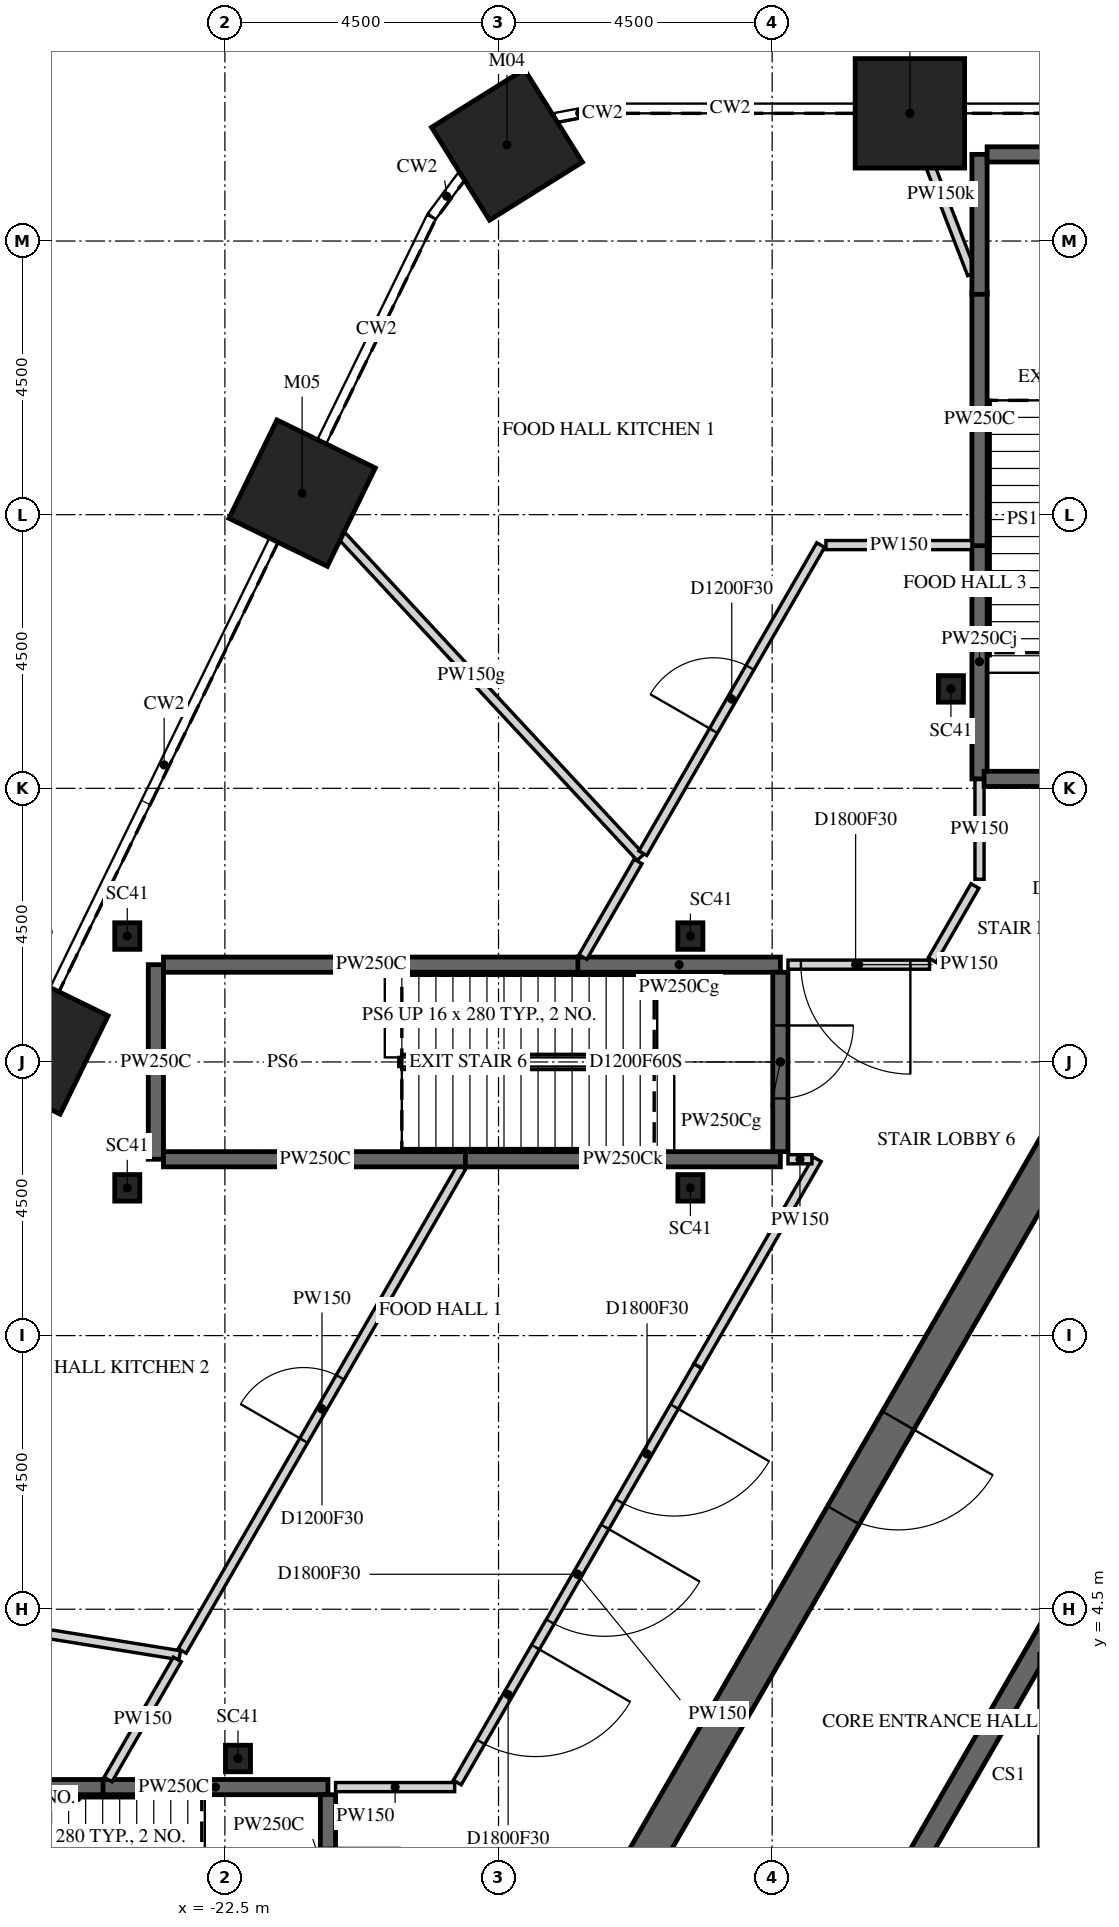
"""IFC4 building model, lengths in metres.
Left out: names, types, materials, properties, quantities, classifications, styles, units other than length and angle.
Written with IfcOpenShell. Run it as: python <this file> out.ifc"""

import sys

from ifc_helpers import new_model, si_unit, direction, frame, frame_2d, origin, origin_2d, place, context, subcontext, project, spatial, polyline, rectangle, i_section, outline, extrude, element, fill, save


model = new_model("IFC4")
c1 = context("Model", 3, precision=1e-05, world=origin(), true_north=direction((0.0, 1.0)))
c2 = subcontext(c1, "Body", "Model", "MODEL_VIEW")
j1 = project(units=[si_unit("LENGTHUNIT", "METRE"), si_unit("PLANEANGLEUNIT", "RADIAN")], contexts=[c1])
p1 = place(None, origin())
s1 = spatial("IfcSite", under=j1, at=p1, CompositionType="ELEMENT")
p2 = place(p1, origin())
s2 = spatial("IfcBuilding", under=s1, at=p2, CompositionType="ELEMENT")
p3 = place(p2, frame((0.0, 0.0, 20.5)))
s3 = spatial("IfcBuildingStorey", under=s2, at=p3, CompositionType="ELEMENT", Elevation=20.5)
for number, where, z_axis, x_axis in (
    (1, (-11.235, 29.1, -0.25), (0.0, 0.0, 1.0), (1.0, 0.0, 0.0)),
    (2, (-17.861, 28.583, -0.25), (0.0, 0.0, 1.0), (0.848, 0.53, 0.0)),
    (3, (-21.23, 22.854, -0.25), (0.0, 0.0, 1.0), (0.438, 0.899, 0.0)),
    (4, (-25.624, 13.845, -0.25), (0.0, 0.0, 1.0), (0.438, 0.899, 0.0)),
):
    element("IfcColumn", number, at=place(p3, frame(where, z_axis=z_axis, x_axis=x_axis)), inside=s3, PredefinedType="COLUMN", context=c2, shape_type="SweptSolid", body=[
        extrude(rectangle(XDim=1.8, YDim=1.8, at=origin_2d()), origin(), (0.0, 0.0, 1.0), 5.5),
    ])
for number, where, z_axis, x_axis in (
    (5, (-10.56, 19.635, -0.25), (0.0, 0.0, 1.0), (1.0, 0.0, 0.0)),
    (6, (-22.285, 2.045, -0.25), (0.0, 0.0, 1.0), (1.0, 0.0, 0.0)),
    (7, (-24.105, 11.43, -0.25), (0.0, 0.0, 1.0), (1.0, 0.0, 0.0)),
    (8, (-24.105, 15.57, -0.25), (0.0, 0.0, 1.0), (1.0, 0.0, 0.0)),
    (9, (-14.845, 15.57, -0.25), (0.0, 0.0, 1.0), (1.0, 0.0, 0.0)),
    (10, (-14.845, 11.43, -0.25), (0.0, 0.0, 1.0), (1.0, 0.0, 0.0)),
):
    element("IfcColumn", number, at=place(p3, frame(where, z_axis=z_axis, x_axis=x_axis)), inside=s3, PredefinedType="COLUMN", context=c2, shape_type="SweptSolid", body=[
        extrude(i_section(OverallWidth=0.412, OverallDepth=0.437, WebThickness=0.036, FlangeThickness=0.058, FilletRadius=0.015, at=origin_2d()), origin(), (0.0, 0.0, 1.0), 5.5),
    ])
p4 = place(p3, frame((-7.91, 13.7, -0.25), z_axis=(0.0, 0.0, 1.0), x_axis=(-0.499999880136, -0.866025472988, 0.0)))
e11 = element("IfcWall", 11, at=p4, inside=s3, PredefinedType="SHEAR", context=c2, shape_type="SweptSolid", body=[
    extrude(outline(polyline([(-0.173, -0.3), (15.993, -0.3), (15.646, 0.3), (0.173, 0.3), (-0.173, -0.3)])), origin(), (0.0, 0.0, 1.0), 5.5),
])
p5 = place(p4, frame((7.039, 0.0, 0.25)))
e12 = element("IfcOpeningElement", 12, at=p5, cuts=e11, PredefinedType="OPENING", context=c2, shape_type="SweptSolid", body=[
    extrude(rectangle(XDim=1.8, YDim=2.4, at=frame_2d((0.9, 1.2))), frame((0.0, 0.31, 0.0), z_axis=(0.0, -1.0, 0.0), x_axis=(1.0, 0.0, 0.0)), (0.0, 0.0, 1.0), 0.62),
])
p6 = place(p3, frame((-5.673, 9.825, -0.25), z_axis=(0.0, 0.0, 1.0), x_axis=(-0.499995046907, -0.866028263435, 0.0)))
e13 = element("IfcWall", 13, at=p6, inside=s3, PredefinedType="SHEAR", context=c2, shape_type="SweptSolid", body=[
    extrude(outline(polyline([(-0.101, -0.175), (11.446, -0.175), (11.244, 0.175), (0.101, 0.175), (-0.101, -0.175)])), origin(), (0.0, 0.0, 1.0), 5.5),
])
p7 = place(p6, frame((4.801, 0.0, 0.25)))
e14 = element("IfcOpeningElement", 14, at=p7, cuts=e13, PredefinedType="OPENING", context=c2, shape_type="SweptSolid", body=[
    extrude(rectangle(XDim=1.8, YDim=2.4, at=frame_2d((0.9, 1.2))), frame((0.0, 0.185, 0.0), z_axis=(0.0, -1.0, 0.0), x_axis=(1.0, 0.0, 0.0)), (0.0, 0.0, 1.0), 0.37),
])
p8 = place(p3, frame((-30.95, 1.575, 0.0), z_axis=(0.0, 0.0, 1.0), x_axis=(1.0, 0.0, 0.0)))
e15 = element("IfcWall", 15, at=p8, inside=s3, PredefinedType="PARTITIONING", context=c2, shape_type="SweptSolid", body=[
    extrude(rectangle(XDim=6.468, YDim=0.25, at=frame_2d((3.234, 0.0))), origin(), (0.0, 0.0, 1.0), 5.25),
])
p9 = place(p3, frame((-30.018, 4.836, 0.0), z_axis=(0.0, 0.0, 1.0), x_axis=(0.987261315122, -0.159107182941, 0.0)))
e16 = element("IfcWall", 16, at=p9, inside=s3, PredefinedType="PARTITIONING", context=c2, shape_type="SweptSolid", body=[
    extrude(rectangle(XDim=6.864, YDim=0.15, at=frame_2d((3.432, 0.0))), origin(), (0.0, 0.0, 1.0), 5.25),
])
p10 = place(p3, frame((-24.504, 1.575, 0.0), z_axis=(0.0, 0.0, 1.0), x_axis=(1.0, 0.0, 0.0)))
e17 = element("IfcWall", 17, at=p10, inside=s3, PredefinedType="PARTITIONING", context=c2, shape_type="SweptSolid", body=[
    extrude(rectangle(XDim=3.699, YDim=0.25, at=frame_2d((1.85, 0.0))), origin(), (0.0, 0.0, 1.0), 5.25),
])
p11 = place(p3, frame((-23.635, 11.9, 0.0), z_axis=(0.0, 0.0, 1.0), x_axis=(0.0, 1.0, 0.0)))
e18 = element("IfcWall", 18, at=p11, inside=s3, PredefinedType="PARTITIONING", context=c2, shape_type="SweptSolid", body=[
    extrude(rectangle(XDim=3.2, YDim=0.25, at=frame_2d((1.6, 0.0))), origin(), (0.0, 0.0, 1.0), 5.25),
])
p12 = place(p3, frame((-23.51, 15.1, 0.0), z_axis=(0.0, 0.0, 1.0), x_axis=(1.0, 0.0, 0.0)))
e19 = element("IfcWall", 19, at=p12, inside=s3, PredefinedType="PARTITIONING", context=c2, shape_type="SweptSolid", body=[
    extrude(rectangle(XDim=6.837, YDim=0.25, at=frame_2d((3.418, 0.0))), origin(), (0.0, 0.0, 1.0), 5.25),
])
p13 = place(p3, frame((-23.282, 3.675, 0.0), z_axis=(0.0, 0.0, 1.0), x_axis=(-0.49987077196, -0.866100000774, 0.0)))
e20 = element("IfcWall", 20, at=p13, inside=s3, PredefinedType="PARTITIONING", context=c2, shape_type="SweptSolid", body=[
    extrude(rectangle(XDim=2.28, YDim=0.15, at=frame_2d((1.14, 0.0))), origin(), (0.0, 0.0, 1.0), 5.25),
])
p14 = place(p3, frame((-21.23, 22.854, 0.0), z_axis=(0.0, 0.0, 1.0), x_axis=(0.680630925451, -0.732626469164, 0.0)))
e21 = element("IfcWall", 21, at=p14, inside=s3, PredefinedType="PARTITIONING", context=c2, shape_type="SweptSolid", body=[
    extrude(rectangle(XDim=8.175, YDim=0.15, at=frame_2d((4.087, 0.0))), origin(), (0.0, 0.0, 1.0), 4.488),
])
p15 = place(p3, frame((-20.805, 1.45, 0.0), z_axis=(0.0, 0.0, 1.0), x_axis=(0.0, -1.0, 0.0)))
e22 = element("IfcWall", 22, at=p15, inside=s3, PredefinedType="PARTITIONING", context=c2, shape_type="SweptSolid", body=[
    extrude(rectangle(XDim=2.95, YDim=0.25, at=frame_2d((1.475, 0.0))), origin(), (0.0, 0.0, 1.0), 5.25),
])
p16 = place(p15, frame((0.875, 0.0, 0.0)))
e23 = element("IfcOpeningElement", 23, at=p16, cuts=e22, PredefinedType="OPENING", context=c2, shape_type="SweptSolid", body=[
    extrude(rectangle(XDim=1.2, YDim=2.1, at=frame_2d((0.6, 1.05))), frame((0.0, 0.135, 0.0), z_axis=(0.0, -1.0, 0.0), x_axis=(1.0, 0.0, 0.0)), (0.0, 0.0, 1.0), 0.27),
])
p17 = place(p3, frame((-20.68, 1.575, 0.0), z_axis=(0.0, 0.0, 1.0), x_axis=(1.0, 0.0, 0.0)))
e24 = element("IfcWall", 24, at=p17, inside=s3, PredefinedType="PARTITIONING", context=c2, shape_type="SweptSolid", body=[
    extrude(rectangle(XDim=1.959, YDim=0.15, at=frame_2d((0.979, 0.0))), origin(), (0.0, 0.0, 1.0), 5.25),
])
p18 = place(p3, frame((-23.202, 3.813, 0.0), z_axis=(0.0, 0.0, 1.0), x_axis=(0.500012104326, 0.866018415236, 0.0)))
e25 = element("IfcWall", 25, at=p18, inside=s3, PredefinedType="PARTITIONING", context=c2, shape_type="SweptSolid", body=[
    extrude(rectangle(XDim=9.193, YDim=0.15, at=frame_2d((4.597, 0.0))), origin(), (0.0, 0.0, 1.0), 5.25),
])
p19 = place(p18, frame((3.997, 0.0, 0.0)))
e26 = element("IfcOpeningElement", 26, at=p19, cuts=e25, PredefinedType="OPENING", context=c2, shape_type="SweptSolid", body=[
    extrude(rectangle(XDim=1.2, YDim=2.1, at=frame_2d((0.6, 1.05))), frame((0.0, 0.085, 0.0), z_axis=(0.0, -1.0, 0.0), x_axis=(1.0, 0.0, 0.0)), (0.0, 0.0, 1.0), 0.17),
])
p20 = place(p3, frame((-18.523, 11.9, 0.0), z_axis=(0.0, 0.0, 1.0), x_axis=(-1.0, 0.0, 0.0)))
e27 = element("IfcWall", 27, at=p20, inside=s3, PredefinedType="PARTITIONING", context=c2, shape_type="SweptSolid", body=[
    extrude(rectangle(XDim=4.987, YDim=0.25, at=frame_2d((2.494, 0.0))), origin(), (0.0, 0.0, 1.0), 5.25),
])
p21 = place(p3, frame((-16.695, 15.1, 0.0), z_axis=(0.0, 0.0, 1.0), x_axis=(1.0, 0.0, 0.0)))
e28 = element("IfcWall", 28, at=p21, inside=s3, PredefinedType="PARTITIONING", context=c2, shape_type="SweptSolid", body=[
    extrude(rectangle(XDim=3.33, YDim=0.25, at=frame_2d((1.665, 0.0))), origin(), (0.0, 0.0, 1.0), 4.488),
])
p22 = place(p3, frame((-15.705, 16.797, 0.0), z_axis=(0.0, 0.0, 1.0), x_axis=(-0.499943671218, -0.86605792278, 0.0)))
e29 = element("IfcWall", 29, at=p22, inside=s3, PredefinedType="PARTITIONING", context=c2, shape_type="SweptSolid", body=[
    extrude(rectangle(XDim=1.815, YDim=0.15, at=frame_2d((0.908, 0.0))), origin(), (0.0, 0.0, 1.0), 5.25),
])
p23 = place(p3, frame((-14.722, 8.5, 0.0), z_axis=(0.0, 0.0, 1.0), x_axis=(-0.500085786821, -0.865975869075, 0.0)))
e30 = element("IfcWall", 30, at=p23, inside=s3, PredefinedType="PARTITIONING", context=c2, shape_type="SweptSolid", body=[
    extrude(rectangle(XDim=7.91, YDim=0.15, at=frame_2d((3.955, 0.0))), origin(), (0.0, 0.0, 1.0), 5.25),
])
p24 = place(p23, frame((0.771, 0.0, 0.0)))
e31 = element("IfcOpeningElement", 31, at=p24, cuts=e30, PredefinedType="OPENING", context=c2, shape_type="SweptSolid", body=[
    extrude(rectangle(XDim=1.8, YDim=2.1, at=frame_2d((0.9, 1.05))), frame((0.0, 0.085, 0.0), z_axis=(0.0, -1.0, 0.0), x_axis=(1.0, 0.0, 0.0)), (0.0, 0.0, 1.0), 0.17),
])
p25 = place(p23, frame((3.055, 0.0, 0.0)))
e32 = element("IfcOpeningElement", 32, at=p25, cuts=e30, PredefinedType="OPENING", context=c2, shape_type="SweptSolid", body=[
    extrude(rectangle(XDim=1.8, YDim=2.1, at=frame_2d((0.9, 1.05))), frame((0.0, 0.085, 0.0), z_axis=(0.0, -1.0, 0.0), x_axis=(1.0, 0.0, 0.0)), (0.0, 0.0, 1.0), 0.17),
])
p26 = place(p23, frame((5.339, 0.0, 0.0)))
e33 = element("IfcOpeningElement", 33, at=p26, cuts=e30, PredefinedType="OPENING", context=c2, shape_type="SweptSolid", body=[
    extrude(rectangle(XDim=1.8, YDim=2.1, at=frame_2d((0.9, 1.05))), frame((0.0, 0.085, 0.0), z_axis=(0.0, -1.0, 0.0), x_axis=(1.0, 0.0, 0.0)), (0.0, 0.0, 1.0), 0.17),
])
p27 = place(p3, frame((-13.365, 11.9, 0.0), z_axis=(0.0, 0.0, 1.0), x_axis=(-1.0, 0.0, 0.0)))
e34 = element("IfcWall", 34, at=p27, inside=s3, PredefinedType="PARTITIONING", context=c2, shape_type="SweptSolid", body=[
    extrude(rectangle(XDim=5.18, YDim=0.25, at=frame_2d((2.59, 0.0))), origin(), (0.0, 0.0, 1.0), 4.797),
])
p28 = place(p3, frame((-13.365, 14.975, 0.0), z_axis=(0.0, 0.0, 1.0), x_axis=(0.0, -1.0, 0.0)))
e35 = element("IfcWall", 35, at=p28, inside=s3, PredefinedType="PARTITIONING", context=c2, shape_type="SweptSolid", body=[
    extrude(rectangle(XDim=2.95, YDim=0.25, at=frame_2d((1.475, 0.0))), origin(), (0.0, 0.0, 1.0), 4.488),
])
p29 = place(p28, frame((0.875, 0.0, 0.0)))
e36 = element("IfcOpeningElement", 36, at=p29, cuts=e35, PredefinedType="OPENING", context=c2, shape_type="SweptSolid", body=[
    extrude(rectangle(XDim=1.2, YDim=2.1, at=frame_2d((0.6, 1.05))), frame((0.0, 0.135, 0.0), z_axis=(0.0, -1.0, 0.0), x_axis=(1.0, 0.0, 0.0)), (0.0, 0.0, 1.0), 0.27),
])
p30 = place(p3, frame((-10.912, 15.1, 0.0), z_axis=(0.0, 0.0, 1.0), x_axis=(-1.0, 0.0, 0.0)))
e37 = element("IfcWall", 37, at=p30, inside=s3, PredefinedType="PARTITIONING", context=c2, shape_type="SweptSolid", body=[
    extrude(rectangle(XDim=2.328, YDim=0.15, at=frame_2d((1.164, 0.0))), origin(), (0.0, 0.0, 1.0), 5.25),
])
p31 = place(p30, frame((0.315, 0.0, 0.0)))
e38 = element("IfcOpeningElement", 38, at=p31, cuts=e37, PredefinedType="OPENING", context=c2, shape_type="SweptSolid", body=[
    extrude(rectangle(XDim=1.8, YDim=2.1, at=frame_2d((0.9, 1.05))), frame((0.0, 0.085, 0.0), z_axis=(0.0, -1.0, 0.0), x_axis=(1.0, 0.0, 0.0)), (0.0, 0.0, 1.0), 0.17),
])
p32 = place(p3, frame((-12.759, 11.9, 0.0), z_axis=(0.0, 0.0, 1.0), x_axis=(-0.49999161165, -0.866030246746, 0.0)))
e39 = element("IfcWall", 39, at=p32, inside=s3, PredefinedType="PARTITIONING", context=c2, shape_type="SweptSolid", body=[
    extrude(rectangle(XDim=3.926, YDim=0.15, at=frame_2d((1.963, 0.0))), origin(), (0.0, 0.0, 1.0), 5.25),
])
p33 = place(p3, frame((-12.846, 11.9, 0.0), z_axis=(0.0, 0.0, 1.0), x_axis=(-1.0, 0.0, 0.0)))
e40 = element("IfcWall", 40, at=p33, inside=s3, PredefinedType="PARTITIONING", context=c2, shape_type="SweptSolid", body=[
    extrude(rectangle(XDim=0.394, YDim=0.15, at=frame_2d((0.197, 0.0))), origin(), (0.0, 0.0, 1.0), 5.25),
])
p34 = place(p3, frame((-15.627, 16.933, 0.0), z_axis=(0.0, 0.0, 1.0), x_axis=(0.499909086075, 0.866077886601, 0.0)))
e41 = element("IfcWall", 41, at=p34, inside=s3, PredefinedType="PARTITIONING", context=c2, shape_type="SweptSolid", body=[
    extrude(rectangle(XDim=5.851, YDim=0.15, at=frame_2d((2.925, 0.0))), origin(), (0.0, 0.0, 1.0), 5.25),
])
p35 = place(p34, frame((2.325, 0.0, 0.0)))
e42 = element("IfcOpeningElement", 42, at=p35, cuts=e41, PredefinedType="OPENING", context=c2, shape_type="SweptSolid", body=[
    extrude(rectangle(XDim=1.2, YDim=2.1, at=frame_2d((0.6, 1.05))), frame((0.0, 0.085, 0.0), z_axis=(0.0, -1.0, 0.0), x_axis=(1.0, 0.0, 0.0)), (0.0, 0.0, 1.0), 0.17),
])
p36 = place(p3, frame((-11.235, 29.1, 0.0), z_axis=(0.0, 0.0, 1.0), x_axis=(0.360012438309, -0.932947503487, 0.0)))
e43 = element("IfcWall", 43, at=p36, inside=s3, PredefinedType="PARTITIONING", context=c2, shape_type="SweptSolid", body=[
    extrude(rectangle(XDim=2.833, YDim=0.15, at=frame_2d((1.417, 0.0))), origin(), (0.0, 0.0, 1.0), 4.323),
])
p37 = place(p3, frame((-10.09, 16.504, 0.0), z_axis=(0.0, 0.0, 1.0), x_axis=(0.0, 1.0, 0.0)))
e44 = element("IfcWall", 44, at=p37, inside=s3, PredefinedType="PARTITIONING", context=c2, shape_type="SweptSolid", body=[
    extrude(rectangle(XDim=1.651, YDim=0.15, at=frame_2d((0.826, 0.0))), origin(), (0.0, 0.0, 1.0), 5.25),
])
p38 = place(p3, frame((-10.165, 16.394, 0.0), z_axis=(0.0, 0.0, 1.0), x_axis=(-0.499907644242, -0.866078718841, 0.0)))
e45 = element("IfcWall", 45, at=p38, inside=s3, PredefinedType="PARTITIONING", context=c2, shape_type="SweptSolid", body=[
    extrude(rectangle(XDim=1.407, YDim=0.15, at=frame_2d((0.704, 0.0))), origin(), (0.0, 0.0, 1.0), 5.25),
])
p39 = place(p3, frame((-10.09, 18.155, 0.0), z_axis=(0.0, 0.0, 1.0), x_axis=(0.0, 1.0, 0.0)))
e46 = element("IfcWall", 46, at=p39, inside=s3, PredefinedType="PARTITIONING", context=c2, shape_type="SweptSolid", body=[
    extrude(rectangle(XDim=3.855, YDim=0.25, at=frame_2d((1.927, 0.0))), origin(), (0.0, 0.0, 1.0), 4.717),
])
p40 = place(p3, frame((-6.89, 18.155, 0.0), z_axis=(0.0, 0.0, 1.0), x_axis=(-1.0, 0.0, 0.0)))
e47 = element("IfcWall", 47, at=p40, inside=s3, PredefinedType="PARTITIONING", context=c2, shape_type="SweptSolid", body=[
    extrude(rectangle(XDim=3.125, YDim=0.25, at=frame_2d((1.562, 0.0))), origin(), (0.0, 0.0, 1.0), 5.25),
])
p41 = place(p40, frame((0.962, 0.0, 0.0)))
e48 = element("IfcOpeningElement", 48, at=p41, cuts=e47, PredefinedType="OPENING", context=c2, shape_type="SweptSolid", body=[
    extrude(rectangle(XDim=1.2, YDim=2.1, at=frame_2d((0.6, 1.05))), frame((0.0, 0.135, 0.0), z_axis=(0.0, -1.0, 0.0), x_axis=(1.0, 0.0, 0.0)), (0.0, 0.0, 1.0), 0.27),
])
p42 = place(p3, frame((-10.09, 21.99, 0.0), z_axis=(0.0, 0.0, 1.0), x_axis=(0.0, 1.0, 0.0)))
e49 = element("IfcWall", 49, at=p42, inside=s3, PredefinedType="PARTITIONING", context=c2, shape_type="SweptSolid", body=[
    extrude(rectangle(XDim=4.17, YDim=0.25, at=frame_2d((2.085, 0.0))), origin(), (0.0, 0.0, 1.0), 5.25),
])
p43 = place(p3, frame((-10.215, 22.0, 0.0), z_axis=(0.0, 0.0, 1.0), x_axis=(-1.0, 0.0, 0.0)))
e50 = element("IfcWall", 50, at=p43, inside=s3, PredefinedType="PARTITIONING", context=c2, shape_type="SweptSolid", body=[
    extrude(rectangle(XDim=2.4, YDim=0.15, at=frame_2d((1.2, 0.0))), origin(), (0.0, 0.0, 1.0), 5.25),
])
p44 = place(p3, frame((-10.09, 26.124, 0.0), z_axis=(0.0, 0.0, 1.0), x_axis=(0.0, 1.0, 0.0)))
e51 = element("IfcWall", 51, at=p44, inside=s3, PredefinedType="PARTITIONING", context=c2, shape_type="SweptSolid", body=[
    extrude(rectangle(XDim=2.301, YDim=0.25, at=frame_2d((1.15, 0.0))), origin(), (0.0, 0.0, 1.0), 5.25),
])
p45 = place(p3, frame((-9.965, 28.425, 0.0), z_axis=(0.0, 0.0, 1.0), x_axis=(1.0, 0.0, 0.0)))
e52 = element("IfcWall", 52, at=p45, inside=s3, PredefinedType="PARTITIONING", context=c2, shape_type="SweptSolid", body=[
    extrude(rectangle(XDim=3.075, YDim=0.25, at=frame_2d((1.538, 0.0))), origin(), (0.0, 0.0, 1.0), 5.25),
])
p46 = place(p5, origin())
e53 = element("IfcDoor", 53, at=p46, inside=s3, OperationType="DOUBLE_DOOR_SINGLE_SWING", PredefinedType="DOOR", context=c2, shape_type="SweptSolid", body=[
    extrude(rectangle(XDim=1.8, YDim=2.4, at=frame_2d((0.9, 1.2))), frame((0.0, 0.025, 0.0), z_axis=(0.0, -1.0, 0.0), x_axis=(1.0, 0.0, 0.0)), (0.0, 0.0, 1.0), 0.05),
])
fill(e12, e53)
p47 = place(p19, origin())
e54 = element("IfcDoor", 54, at=p47, inside=s3, OperationType="SINGLE_SWING_LEFT", PredefinedType="DOOR", context=c2, shape_type="SweptSolid", body=[
    extrude(rectangle(XDim=1.2, YDim=2.1, at=frame_2d((0.6, 1.05))), frame((0.0, 0.025, 0.0), z_axis=(0.0, -1.0, 0.0), x_axis=(1.0, 0.0, 0.0)), (0.0, 0.0, 1.0), 0.05),
])
fill(e26, e54)
p48 = place(p24, origin())
e55 = element("IfcDoor", 55, at=p48, inside=s3, OperationType="DOUBLE_DOOR_SINGLE_SWING", PredefinedType="DOOR", context=c2, shape_type="SweptSolid", body=[
    extrude(rectangle(XDim=1.8, YDim=2.1, at=frame_2d((0.9, 1.05))), frame((0.0, 0.025, 0.0), z_axis=(0.0, -1.0, 0.0), x_axis=(1.0, 0.0, 0.0)), (0.0, 0.0, 1.0), 0.05),
])
fill(e31, e55)
p49 = place(p25, origin())
e56 = element("IfcDoor", 56, at=p49, inside=s3, OperationType="DOUBLE_DOOR_SINGLE_SWING", PredefinedType="DOOR", context=c2, shape_type="SweptSolid", body=[
    extrude(rectangle(XDim=1.8, YDim=2.1, at=frame_2d((0.9, 1.05))), frame((0.0, 0.025, 0.0), z_axis=(0.0, -1.0, 0.0), x_axis=(1.0, 0.0, 0.0)), (0.0, 0.0, 1.0), 0.05),
])
fill(e32, e56)
p50 = place(p26, origin())
e57 = element("IfcDoor", 57, at=p50, inside=s3, OperationType="DOUBLE_DOOR_SINGLE_SWING", PredefinedType="DOOR", context=c2, shape_type="SweptSolid", body=[
    extrude(rectangle(XDim=1.8, YDim=2.1, at=frame_2d((0.9, 1.05))), frame((0.0, 0.025, 0.0), z_axis=(0.0, -1.0, 0.0), x_axis=(1.0, 0.0, 0.0)), (0.0, 0.0, 1.0), 0.05),
])
fill(e33, e57)
p51 = place(p29, origin())
e58 = element("IfcDoor", 58, at=p51, inside=s3, OperationType="SINGLE_SWING_RIGHT", PredefinedType="DOOR", context=c2, shape_type="SweptSolid", body=[
    extrude(rectangle(XDim=1.2, YDim=2.1, at=frame_2d((0.6, 1.05))), frame((0.0, 0.025, 0.0), z_axis=(0.0, -1.0, 0.0), x_axis=(1.0, 0.0, 0.0)), (0.0, 0.0, 1.0), 0.05),
])
fill(e36, e58)
p52 = place(p31, origin())
e59 = element("IfcDoor", 59, at=p52, inside=s3, OperationType="DOUBLE_DOOR_SINGLE_SWING", PredefinedType="DOOR", context=c2, shape_type="SweptSolid", body=[
    extrude(rectangle(XDim=1.8, YDim=2.1, at=frame_2d((0.9, 1.05))), frame((0.0, 0.025, 0.0), z_axis=(0.0, -1.0, 0.0), x_axis=(1.0, 0.0, 0.0)), (0.0, 0.0, 1.0), 0.05),
])
fill(e38, e59)
p53 = place(p35, origin())
e60 = element("IfcDoor", 60, at=p53, inside=s3, OperationType="SINGLE_SWING_RIGHT", PredefinedType="DOOR", context=c2, shape_type="SweptSolid", body=[
    extrude(rectangle(XDim=1.2, YDim=2.1, at=frame_2d((0.6, 1.05))), frame((0.0, 0.025, 0.0), z_axis=(0.0, -1.0, 0.0), x_axis=(1.0, 0.0, 0.0)), (0.0, 0.0, 1.0), 0.05),
])
fill(e42, e60)
save(model, sys.argv[1])
